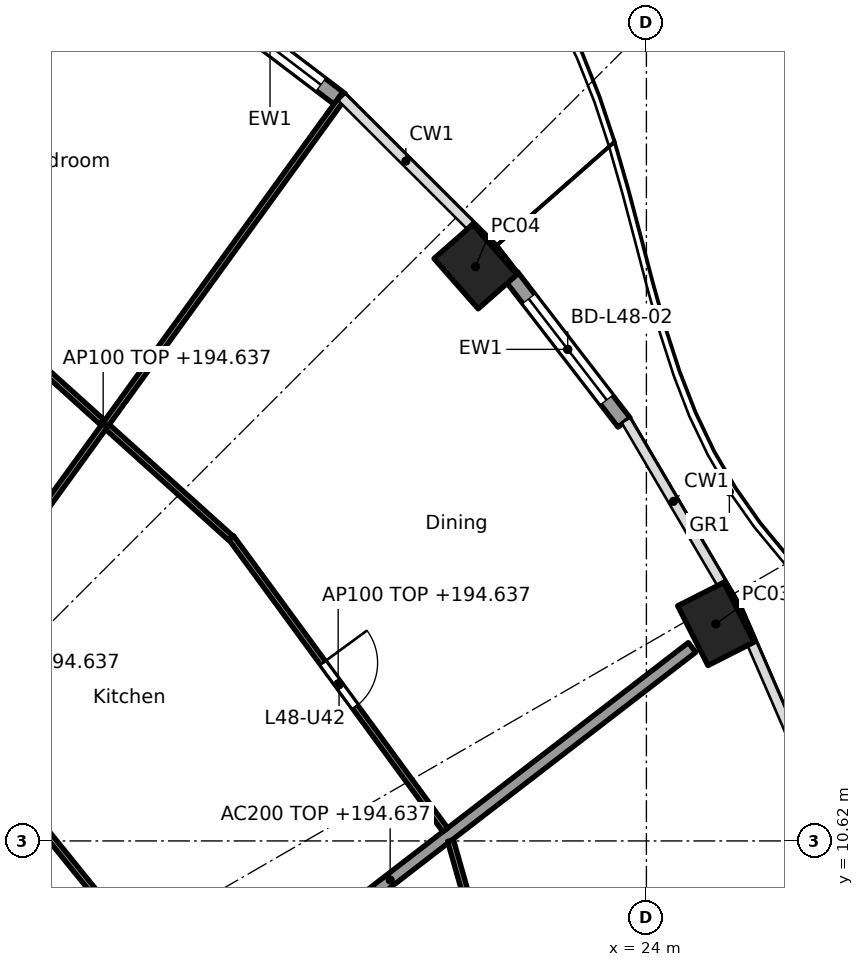
"""IFC4 building model, lengths in metres.
Left out: names, types, materials, properties, quantities, classifications, styles, units other than length and angle.
Written with IfcOpenShell. Run it as: python <this file> out.ifc"""

import sys

from ifc_helpers import new_model, si_unit, direction, frame, frame_2d, origin, origin_2d, place, context, subcontext, project, spatial, rectangle, hollow_rectangle, extrude, element, fill, save


model = new_model("IFC4")
c1 = context("Model", 3, precision=1e-05, world=origin(), true_north=direction((0.0, 1.0)))
c2 = subcontext(c1, "Body", "Model", "MODEL_VIEW")
j1 = project(units=[si_unit("LENGTHUNIT", "METRE"), si_unit("PLANEANGLEUNIT", "RADIAN")], contexts=[c1])
p1 = place(None, origin())
s1 = spatial("IfcSite", under=j1, at=p1, CompositionType="ELEMENT")
p2 = place(p1, origin())
s2 = spatial("IfcBuilding", under=s1, at=p2, CompositionType="ELEMENT")
p3 = place(p2, frame((0.0, 0.0, 191.8)))
s3 = spatial("IfcBuildingStorey", under=s2, at=p3, CompositionType="ELEMENT", Elevation=191.8)
for number, where, z_axis, x_axis in (
    (1, (25.142, 14.188, 0.0), (0.0, 0.0, 1.0), (-0.452, 0.892, 0.0)),
    (2, (21.189, 20.064, 0.0), (0.0, 0.0, 1.0), (-0.66, 0.751, 0.0)),
):
    element("IfcColumn", number, at=place(p3, frame(where, z_axis=z_axis, x_axis=x_axis)), inside=s3, PredefinedType="COLUMN", context=c2, shape_type="SweptSolid", body=[
        extrude(hollow_rectangle(XDim=1.1, YDim=0.85, WallThickness=0.036, at=origin_2d()), origin(), (0.0, 0.0, 1.0), 3.7),
    ])
p4 = place(p3, frame((21.78, 19.906, 0.0), z_axis=(0.0, 0.0, 1.0), x_axis=(0.610437428894, -0.79206448311, 0.0)))
e3 = element("IfcWall", 3, at=p4, inside=s3, PredefinedType="SOLIDWALL", context=c2, shape_type="SweptSolid", body=[
    extrude(rectangle(XDim=3.035, YDim=0.25, at=frame_2d((1.518, 0.0))), origin(), (0.0, 0.0, 1.0), 3.44),
])
p5 = place(p4, frame((0.468, 0.0, 0.0)))
e4 = element("IfcOpeningElement", 4, at=p5, cuts=e3, PredefinedType="OPENING", context=c2, shape_type="SweptSolid", body=[
    extrude(rectangle(XDim=2.1, YDim=2.4, at=frame_2d((1.05, 1.2))), frame((0.0, 0.135, 0.0), z_axis=(0.0, -1.0, 0.0), x_axis=(1.0, 0.0, 0.0)), (0.0, 0.0, 1.0), 0.27),
])
p6 = place(p3, frame((16.65, 24.574, 0.0), z_axis=(0.0, 0.0, 1.0), x_axis=(0.796055733703, -0.60522332146, 0.0)))
e5 = element("IfcWall", 5, at=p6, inside=s3, PredefinedType="SOLIDWALL", context=c2, shape_type="SweptSolid", body=[
    extrude(rectangle(XDim=2.917, YDim=0.25, at=frame_2d((1.458, 0.0))), origin(), (0.0, 0.0, 1.0), 3.44),
])
p7 = place(p6, frame((0.408, 0.0, 0.0)))
e6 = element("IfcOpeningElement", 6, at=p7, cuts=e5, PredefinedType="OPENING", context=c2, shape_type="SweptSolid", body=[
    extrude(rectangle(XDim=2.1, YDim=2.4, at=frame_2d((1.05, 1.2))), frame((0.0, 0.135, 0.0), z_axis=(0.0, -1.0, 0.0), x_axis=(1.0, 0.0, 0.0)), (0.0, 0.0, 1.0), 0.27),
])
p8 = place(p3, frame((14.822, 6.154, 0.0), z_axis=(0.0, 0.0, 1.0), x_axis=(0.792203056092, 0.610257583254, 0.0)))
e7 = element("IfcWall", 7, at=p8, inside=s3, PredefinedType="PARTITIONING", context=c2, shape_type="SweptSolid", body=[
    extrude(rectangle(XDim=12.533, YDim=0.2, at=frame_2d((6.266, 0.0))), origin(), (0.0, 0.0, 1.0), 2.837),
])
p9 = place(p3, frame((22.189, 5.67, 0.0), z_axis=(0.0, 0.0, 1.0), x_axis=(-0.273819702124, 0.961781040949, 0.0)))
e8 = element("IfcWall", 8, at=p9, inside=s3, PredefinedType="PARTITIONING", context=c2, shape_type="SweptSolid", body=[
    extrude(rectangle(XDim=5.152, YDim=0.1, at=frame_2d((2.576, 0.0))), origin(), (0.0, 0.0, 1.0), 2.837),
])
p10 = place(p3, frame((16.626, 7.67, 0.0), z_axis=(0.0, 0.0, 1.0), x_axis=(-0.628764602857, 0.777595700987, 0.0)))
e9 = element("IfcWall", 9, at=p10, inside=s3, PredefinedType="PARTITIONING", context=c2, shape_type="SweptSolid", body=[
    extrude(rectangle(XDim=4.957, YDim=0.1, at=frame_2d((2.479, 0.0))), origin(), (0.0, 0.0, 1.0), 2.837),
])
p11 = place(p3, frame((20.692, 10.802, 0.0), z_axis=(0.0, 0.0, 1.0), x_axis=(-0.591122127251, 0.806582066918, 0.0)))
e10 = element("IfcWall", 10, at=p11, inside=s3, PredefinedType="PARTITIONING", context=c2, shape_type="SweptSolid", body=[
    extrude(rectangle(XDim=5.96, YDim=0.1, at=frame_2d((2.98, 0.0))), origin(), (0.0, 0.0, 1.0), 2.837),
])
p12 = place(p11, frame((2.505, 0.0, 0.0)))
e11 = element("IfcOpeningElement", 11, at=p12, cuts=e10, PredefinedType="OPENING", context=c2, shape_type="SweptSolid", body=[
    extrude(rectangle(XDim=0.9, YDim=2.1, at=frame_2d((0.45, 1.05))), frame((0.0, 0.06, 0.0), z_axis=(0.0, -1.0, 0.0), x_axis=(1.0, 0.0, 0.0)), (0.0, 0.0, 1.0), 0.12),
])
p13 = place(p3, frame((17.162, 15.603, 0.0), z_axis=(0.0, 0.0, 1.0), x_axis=(-0.742768881471, 0.669547898748, 0.0)))
e12 = element("IfcWall", 12, at=p13, inside=s3, PredefinedType="PARTITIONING", context=c2, shape_type="SweptSolid", body=[
    extrude(rectangle(XDim=5.642, YDim=0.1, at=frame_2d((2.821, 0.0))), origin(), (0.0, 0.0, 1.0), 2.837),
])
p14 = place(p3, frame((8.943, 8.966, 0.0), z_axis=(0.0, 0.0, 1.0), x_axis=(0.586803608919, 0.809729290912, 0.0)))
e13 = element("IfcWall", 13, at=p14, inside=s3, PredefinedType="PARTITIONING", context=c2, shape_type="SweptSolid", body=[
    extrude(rectangle(XDim=17.179, YDim=0.1, at=frame_2d((8.589, 0.0))), origin(), (0.0, 0.0, 1.0), 2.756),
])
p15 = place(p14, frame((2.062, 0.0, 0.0)))
e14 = element("IfcOpeningElement", 14, at=p15, cuts=e13, PredefinedType="OPENING", context=c2, shape_type="SweptSolid", body=[
    extrude(rectangle(XDim=0.9, YDim=2.1, at=frame_2d((0.45, 1.05))), frame((0.0, 0.06, 0.0), z_axis=(0.0, -1.0, 0.0), x_axis=(1.0, 0.0, 0.0)), (0.0, 0.0, 1.0), 0.12),
])
p16 = place(p14, frame((7.308, 0.0, 0.0)))
e15 = element("IfcOpeningElement", 15, at=p16, cuts=e13, PredefinedType="OPENING", context=c2, shape_type="SweptSolid", body=[
    extrude(rectangle(XDim=0.9, YDim=2.1, at=frame_2d((0.45, 1.05))), frame((0.0, 0.06, 0.0), z_axis=(0.0, -1.0, 0.0), x_axis=(1.0, 0.0, 0.0)), (0.0, 0.0, 1.0), 0.12),
])
p17 = place(p5, origin())
e16 = element("IfcDoor", 16, at=p17, inside=s3, OperationType="SLIDING_TO_LEFT", PredefinedType="DOOR", context=c2, shape_type="SweptSolid", body=[
    extrude(rectangle(XDim=2.1, YDim=2.4, at=frame_2d((1.05, 1.2))), frame((0.0, 0.025, 0.0), z_axis=(0.0, -1.0, 0.0), x_axis=(1.0, 0.0, 0.0)), (0.0, 0.0, 1.0), 0.05),
])
fill(e4, e16)
p18 = place(p7, origin())
e17 = element("IfcDoor", 17, at=p18, inside=s3, OperationType="SLIDING_TO_LEFT", PredefinedType="DOOR", context=c2, shape_type="SweptSolid", body=[
    extrude(rectangle(XDim=2.1, YDim=2.4, at=frame_2d((1.05, 1.2))), frame((0.0, 0.025, 0.0), z_axis=(0.0, -1.0, 0.0), x_axis=(1.0, 0.0, 0.0)), (0.0, 0.0, 1.0), 0.05),
])
fill(e6, e17)
p19 = place(p12, frame((0.9, 0.0, 0.0), x_axis=(-1.0, 0.0, 0.0)))
e18 = element("IfcDoor", 18, at=p19, inside=s3, OperationType="SINGLE_SWING_LEFT", PredefinedType="DOOR", context=c2, shape_type="SweptSolid", body=[
    extrude(rectangle(XDim=0.9, YDim=2.1, at=frame_2d((0.45, 1.05))), frame((0.0, 0.025, 0.0), z_axis=(0.0, -1.0, 0.0), x_axis=(1.0, 0.0, 0.0)), (0.0, 0.0, 1.0), 0.05),
])
fill(e11, e18)
save(model, sys.argv[1])
